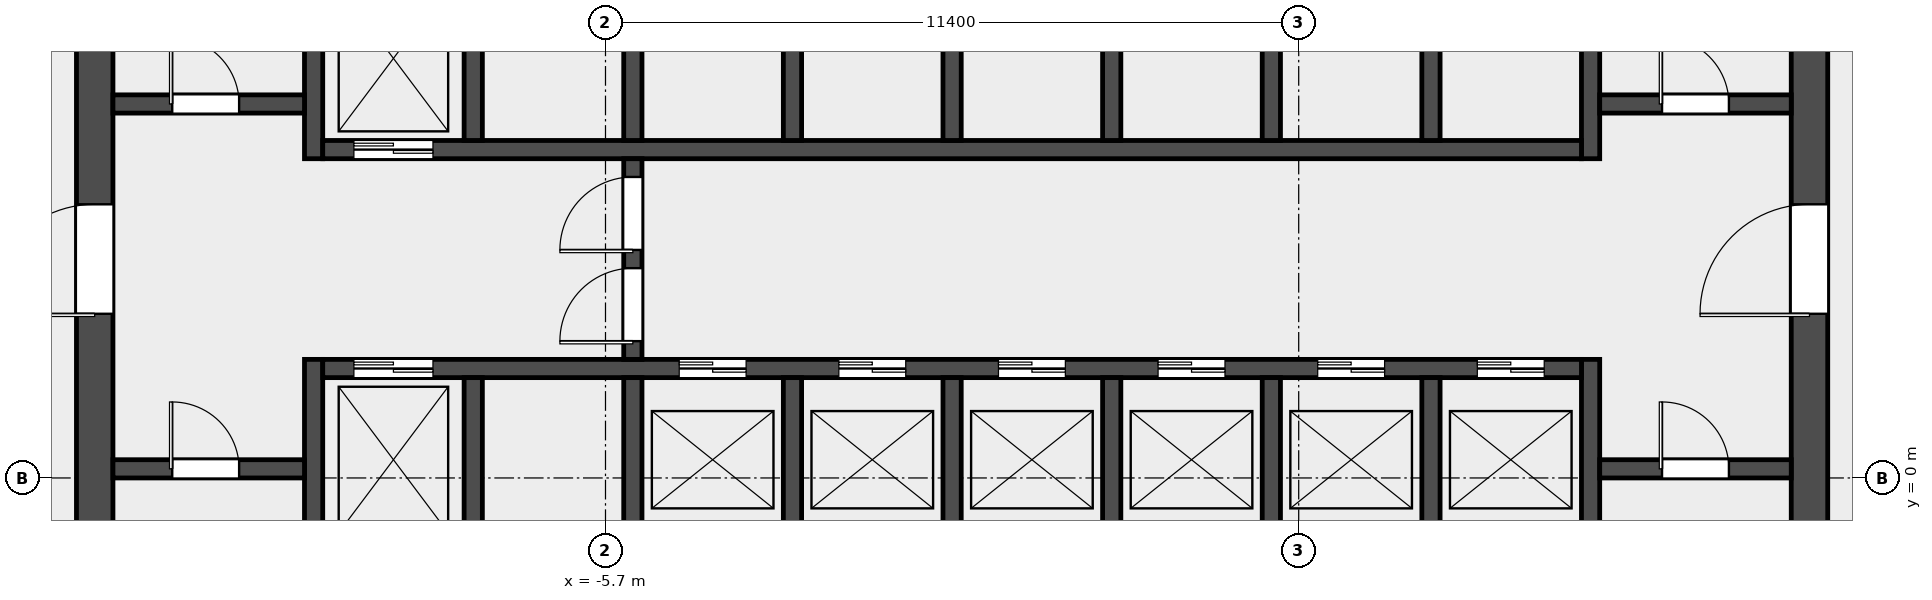
"""IFC4 building model, lengths in metres.
Left out: names, types, materials, properties, quantities, classifications, styles, units other than length and angle.
Written with IfcOpenShell. Run it as: python <this file> out.ifc"""

import sys

from ifc_helpers import new_model, si_unit, direction, frame, frame_2d, origin, place, context, subcontext, project, spatial, rectangle, extrude, element, fill, save


model = new_model("IFC4")
c1 = context("Model", 3, precision=1e-05, world=origin(), true_north=direction((0.0, 1.0)))
c2 = subcontext(c1, "Body", "Model", "MODEL_VIEW")
j1 = project(units=[si_unit("LENGTHUNIT", "METRE"), si_unit("PLANEANGLEUNIT", "RADIAN")], contexts=[c1])
p1 = place(None, origin())
s1 = spatial("IfcSite", under=j1, at=p1, CompositionType="ELEMENT")
p2 = place(p1, origin())
s2 = spatial("IfcBuilding", under=s1, at=p2, CompositionType="ELEMENT")
p3 = place(p2, frame((0.0, 0.0, 83.8)))
s3 = spatial("IfcBuildingStorey", under=s2, at=p3, CompositionType="ELEMENT", Elevation=83.8)
p4 = place(p3, frame((-14.1, -6.6, 0.0), z_axis=(0.0, 0.0, 1.0), x_axis=(0.0, 1.0, 0.0)))
e1 = element("IfcWall", 1, at=p4, inside=s3, PredefinedType="SHEAR", context=c2, shape_type="SweptSolid", body=[
    extrude(rectangle(XDim=19.5, YDim=0.6, at=frame_2d((9.75, 0.0))), origin(), (0.0, 0.0, 1.0), 4.5),
])
p5 = place(p4, frame((9.3, 0.0, 0.0)))
e2 = element("IfcOpeningElement", 2, at=p5, cuts=e1, PredefinedType="OPENING", context=c2, shape_type="SweptSolid", body=[
    extrude(rectangle(XDim=1.8, YDim=2.1, at=frame_2d((0.9, 1.05))), frame((0.0, 0.312, 0.0), z_axis=(0.0, -1.0, 0.0), x_axis=(1.0, 0.0, 0.0)), (0.0, 0.0, 1.0), 0.624),
])
p6 = place(p3, frame((14.1, -6.6, 0.0), z_axis=(0.0, 0.0, 1.0), x_axis=(0.0, 1.0, 0.0)))
e3 = element("IfcWall", 3, at=p6, inside=s3, PredefinedType="SHEAR", context=c2, shape_type="SweptSolid", body=[
    extrude(rectangle(XDim=19.5, YDim=0.6, at=frame_2d((9.75, 0.0))), origin(), (0.0, 0.0, 1.0), 4.5),
])
p7 = place(p6, frame((9.3, 0.0, 0.0)))
e4 = element("IfcOpeningElement", 4, at=p7, cuts=e3, PredefinedType="OPENING", context=c2, shape_type="SweptSolid", body=[
    extrude(rectangle(XDim=1.8, YDim=2.1, at=frame_2d((0.9, 1.05))), frame((0.0, 0.312, 0.0), z_axis=(0.0, -1.0, 0.0), x_axis=(1.0, 0.0, 0.0)), (0.0, 0.0, 1.0), 0.624),
])
p8 = place(p3, frame((-10.5, -6.6, 0.0), z_axis=(0.0, 0.0, 1.0), x_axis=(0.0, 1.0, 0.0)))
e5 = element("IfcWall", 5, at=p8, inside=s3, PredefinedType="SHEAR", context=c2, shape_type="SweptSolid", body=[
    extrude(rectangle(XDim=8.55, YDim=0.3, at=frame_2d((4.275, 0.0))), origin(), (0.0, 0.0, 1.0), 4.5),
])
p9 = place(p3, frame((-10.5, 5.25, 0.0), z_axis=(0.0, 0.0, 1.0), x_axis=(0.0, 1.0, 0.0)))
e6 = element("IfcWall", 6, at=p9, inside=s3, PredefinedType="SHEAR", context=c2, shape_type="SweptSolid", body=[
    extrude(rectangle(XDim=7.65, YDim=0.3, at=frame_2d((3.825, 0.0))), origin(), (0.0, 0.0, 1.0), 4.5),
])
p10 = place(p3, frame((10.5, -6.6, 0.0), z_axis=(0.0, 0.0, 1.0), x_axis=(0.0, 1.0, 0.0)))
e7 = element("IfcWall", 7, at=p10, inside=s3, PredefinedType="SHEAR", context=c2, shape_type="SweptSolid", body=[
    extrude(rectangle(XDim=8.55, YDim=0.3, at=frame_2d((4.275, 0.0))), origin(), (0.0, 0.0, 1.0), 4.5),
])
p11 = place(p3, frame((10.5, 5.25, 0.0), z_axis=(0.0, 0.0, 1.0), x_axis=(0.0, 1.0, 0.0)))
e8 = element("IfcWall", 8, at=p11, inside=s3, PredefinedType="SHEAR", context=c2, shape_type="SweptSolid", body=[
    extrude(rectangle(XDim=7.65, YDim=0.3, at=frame_2d((3.825, 0.0))), origin(), (0.0, 0.0, 1.0), 4.5),
])
p12 = place(p3, frame((-13.8, 0.15, 0.0), z_axis=(0.0, 0.0, 1.0), x_axis=(1.0, 0.0, 0.0)))
e9 = element("IfcWall", 9, at=p12, inside=s3, PredefinedType="SOLIDWALL", context=c2, shape_type="SweptSolid", body=[
    extrude(rectangle(XDim=3.15, YDim=0.3, at=frame_2d((1.575, 0.0))), origin(), (0.0, 0.0, 1.0), 4.5),
])
p13 = place(p12, frame((0.975, 0.0, 0.0)))
e10 = element("IfcOpeningElement", 10, at=p13, cuts=e9, PredefinedType="OPENING", context=c2, shape_type="SweptSolid", body=[
    extrude(rectangle(XDim=1.1, YDim=2.1, at=frame_2d((0.55, 1.05))), frame((0.0, 0.162, 0.0), z_axis=(0.0, -1.0, 0.0), x_axis=(1.0, 0.0, 0.0)), (0.0, 0.0, 1.0), 0.324),
])
p14 = place(p3, frame((-13.8, 6.15, 0.0), z_axis=(0.0, 0.0, 1.0), x_axis=(1.0, 0.0, 0.0)))
e11 = element("IfcWall", 11, at=p14, inside=s3, PredefinedType="SOLIDWALL", context=c2, shape_type="SweptSolid", body=[
    extrude(rectangle(XDim=3.15, YDim=0.3, at=frame_2d((1.575, 0.0))), origin(), (0.0, 0.0, 1.0), 4.5),
])
p15 = place(p14, frame((0.975, 0.0, 0.0)))
e12 = element("IfcOpeningElement", 12, at=p15, cuts=e11, PredefinedType="OPENING", context=c2, shape_type="SweptSolid", body=[
    extrude(rectangle(XDim=1.1, YDim=2.1, at=frame_2d((0.55, 1.05))), frame((0.0, 0.162, 0.0), z_axis=(0.0, -1.0, 0.0), x_axis=(1.0, 0.0, 0.0)), (0.0, 0.0, 1.0), 0.324),
])
p16 = place(p3, frame((10.65, 0.15, 0.0), z_axis=(0.0, 0.0, 1.0), x_axis=(1.0, 0.0, 0.0)))
e13 = element("IfcWall", 13, at=p16, inside=s3, PredefinedType="SOLIDWALL", context=c2, shape_type="SweptSolid", body=[
    extrude(rectangle(XDim=3.15, YDim=0.3, at=frame_2d((1.575, 0.0))), origin(), (0.0, 0.0, 1.0), 4.5),
])
p17 = place(p16, frame((1.025, 0.0, 0.0)))
e14 = element("IfcOpeningElement", 14, at=p17, cuts=e13, PredefinedType="OPENING", context=c2, shape_type="SweptSolid", body=[
    extrude(rectangle(XDim=1.1, YDim=2.1, at=frame_2d((0.55, 1.05))), frame((0.0, 0.162, 0.0), z_axis=(0.0, -1.0, 0.0), x_axis=(1.0, 0.0, 0.0)), (0.0, 0.0, 1.0), 0.324),
])
p18 = place(p3, frame((10.65, 6.15, 0.0), z_axis=(0.0, 0.0, 1.0), x_axis=(1.0, 0.0, 0.0)))
e15 = element("IfcWall", 15, at=p18, inside=s3, PredefinedType="SOLIDWALL", context=c2, shape_type="SweptSolid", body=[
    extrude(rectangle(XDim=3.15, YDim=0.3, at=frame_2d((1.575, 0.0))), origin(), (0.0, 0.0, 1.0), 4.5),
])
p19 = place(p18, frame((1.025, 0.0, 0.0)))
e16 = element("IfcOpeningElement", 16, at=p19, cuts=e15, PredefinedType="OPENING", context=c2, shape_type="SweptSolid", body=[
    extrude(rectangle(XDim=1.1, YDim=2.1, at=frame_2d((0.55, 1.05))), frame((0.0, 0.162, 0.0), z_axis=(0.0, -1.0, 0.0), x_axis=(1.0, 0.0, 0.0)), (0.0, 0.0, 1.0), 0.324),
])
p20 = place(p3, frame((-10.35, 1.8, 0.0), z_axis=(0.0, 0.0, 1.0), x_axis=(1.0, 0.0, 0.0)))
e17 = element("IfcWall", 17, at=p20, inside=s3, PredefinedType="SOLIDWALL", context=c2, shape_type="SweptSolid", body=[
    extrude(rectangle(XDim=20.7, YDim=0.3, at=frame_2d((10.35, 0.0))), origin(), (0.0, 0.0, 1.0), 4.5),
])
p21 = place(p20, frame((0.512, 0.0, 0.0)))
e18 = element("IfcOpeningElement", 18, at=p21, cuts=e17, PredefinedType="OPENING", context=c2, shape_type="SweptSolid", body=[
    extrude(rectangle(XDim=1.3, YDim=2.1, at=frame_2d((0.65, 1.05))), frame((0.0, 0.162, 0.0), z_axis=(0.0, -1.0, 0.0), x_axis=(1.0, 0.0, 0.0)), (0.0, 0.0, 1.0), 0.324),
])
p22 = place(p20, frame((5.863, 0.0, 0.0)))
e19 = element("IfcOpeningElement", 19, at=p22, cuts=e17, PredefinedType="OPENING", context=c2, shape_type="SweptSolid", body=[
    extrude(rectangle(XDim=1.1, YDim=2.1, at=frame_2d((0.55, 1.05))), frame((0.0, 0.162, 0.0), z_axis=(0.0, -1.0, 0.0), x_axis=(1.0, 0.0, 0.0)), (0.0, 0.0, 1.0), 0.324),
])
p23 = place(p20, frame((8.488, 0.0, 0.0)))
e20 = element("IfcOpeningElement", 20, at=p23, cuts=e17, PredefinedType="OPENING", context=c2, shape_type="SweptSolid", body=[
    extrude(rectangle(XDim=1.1, YDim=2.1, at=frame_2d((0.55, 1.05))), frame((0.0, 0.162, 0.0), z_axis=(0.0, -1.0, 0.0), x_axis=(1.0, 0.0, 0.0)), (0.0, 0.0, 1.0), 0.324),
])
p24 = place(p20, frame((11.113, 0.0, 0.0)))
e21 = element("IfcOpeningElement", 21, at=p24, cuts=e17, PredefinedType="OPENING", context=c2, shape_type="SweptSolid", body=[
    extrude(rectangle(XDim=1.1, YDim=2.1, at=frame_2d((0.55, 1.05))), frame((0.0, 0.162, 0.0), z_axis=(0.0, -1.0, 0.0), x_axis=(1.0, 0.0, 0.0)), (0.0, 0.0, 1.0), 0.324),
])
p25 = place(p20, frame((13.738, 0.0, 0.0)))
e22 = element("IfcOpeningElement", 22, at=p25, cuts=e17, PredefinedType="OPENING", context=c2, shape_type="SweptSolid", body=[
    extrude(rectangle(XDim=1.1, YDim=2.1, at=frame_2d((0.55, 1.05))), frame((0.0, 0.162, 0.0), z_axis=(0.0, -1.0, 0.0), x_axis=(1.0, 0.0, 0.0)), (0.0, 0.0, 1.0), 0.324),
])
p26 = place(p20, frame((16.363, 0.0, 0.0)))
e23 = element("IfcOpeningElement", 23, at=p26, cuts=e17, PredefinedType="OPENING", context=c2, shape_type="SweptSolid", body=[
    extrude(rectangle(XDim=1.1, YDim=2.1, at=frame_2d((0.55, 1.05))), frame((0.0, 0.162, 0.0), z_axis=(0.0, -1.0, 0.0), x_axis=(1.0, 0.0, 0.0)), (0.0, 0.0, 1.0), 0.324),
])
p27 = place(p20, frame((18.988, 0.0, 0.0)))
e24 = element("IfcOpeningElement", 24, at=p27, cuts=e17, PredefinedType="OPENING", context=c2, shape_type="SweptSolid", body=[
    extrude(rectangle(XDim=1.1, YDim=2.1, at=frame_2d((0.55, 1.05))), frame((0.0, 0.162, 0.0), z_axis=(0.0, -1.0, 0.0), x_axis=(1.0, 0.0, 0.0)), (0.0, 0.0, 1.0), 0.324),
])
p28 = place(p3, frame((-10.35, 5.4, 0.0), z_axis=(0.0, 0.0, 1.0), x_axis=(1.0, 0.0, 0.0)))
e25 = element("IfcWall", 25, at=p28, inside=s3, PredefinedType="SOLIDWALL", context=c2, shape_type="SweptSolid", body=[
    extrude(rectangle(XDim=20.7, YDim=0.3, at=frame_2d((10.35, 0.0))), origin(), (0.0, 0.0, 1.0), 4.5),
])
p29 = place(p28, frame((0.512, 0.0, 0.0)))
e26 = element("IfcOpeningElement", 26, at=p29, cuts=e25, PredefinedType="OPENING", context=c2, shape_type="SweptSolid", body=[
    extrude(rectangle(XDim=1.3, YDim=2.1, at=frame_2d((0.65, 1.05))), frame((0.0, 0.162, 0.0), z_axis=(0.0, -1.0, 0.0), x_axis=(1.0, 0.0, 0.0)), (0.0, 0.0, 1.0), 0.324),
])
for number, where, z_axis, x_axis in (
    (27, (-7.875, -1.05, 0.0), (0.0, 0.0, 1.0), (0.0, 1.0, 0.0)),
    (28, (-5.25, -1.05, 0.0), (0.0, 0.0, 1.0), (0.0, 1.0, 0.0)),
    (29, (-2.625, -1.05, 0.0), (0.0, 0.0, 1.0), (0.0, 1.0, 0.0)),
    (30, (0.0, -1.05, 0.0), (0.0, 0.0, 1.0), (0.0, 1.0, 0.0)),
    (31, (2.625, -1.05, 0.0), (0.0, 0.0, 1.0), (0.0, 1.0, 0.0)),
    (32, (5.25, -1.05, 0.0), (0.0, 0.0, 1.0), (0.0, 1.0, 0.0)),
    (33, (7.875, -1.05, 0.0), (0.0, 0.0, 1.0), (0.0, 1.0, 0.0)),
    (34, (-7.875, 5.55, 0.0), (0.0, 0.0, 1.0), (0.0, 1.0, 0.0)),
    (35, (-5.25, 5.55, 0.0), (0.0, 0.0, 1.0), (0.0, 1.0, 0.0)),
    (36, (-2.625, 5.55, 0.0), (0.0, 0.0, 1.0), (0.0, 1.0, 0.0)),
    (37, (0.0, 5.55, 0.0), (0.0, 0.0, 1.0), (0.0, 1.0, 0.0)),
    (38, (2.625, 5.55, 0.0), (0.0, 0.0, 1.0), (0.0, 1.0, 0.0)),
    (39, (5.25, 5.55, 0.0), (0.0, 0.0, 1.0), (0.0, 1.0, 0.0)),
    (40, (7.875, 5.55, 0.0), (0.0, 0.0, 1.0), (0.0, 1.0, 0.0)),
):
    element("IfcWall", number, at=place(p3, frame(where, z_axis=z_axis, x_axis=x_axis)), inside=s3, PredefinedType="SOLIDWALL", context=c2, shape_type="SweptSolid", body=[
        extrude(rectangle(XDim=2.7, YDim=0.3, at=frame_2d((1.35, 0.0))), origin(), (0.0, 0.0, 1.0), 4.5),
    ])
p30 = place(p3, frame((-5.25, 1.95, 0.0), z_axis=(0.0, 0.0, 1.0), x_axis=(0.0, 1.0, 0.0)))
e41 = element("IfcWall", 41, at=p30, inside=s3, PredefinedType="SOLIDWALL", context=c2, shape_type="SweptSolid", body=[
    extrude(rectangle(XDim=3.3, YDim=0.3, at=frame_2d((1.65, 0.0))), origin(), (0.0, 0.0, 1.0), 4.5),
])
p31 = place(p30, frame((0.3, 0.0, 0.0)))
e42 = element("IfcOpeningElement", 42, at=p31, cuts=e41, PredefinedType="OPENING", context=c2, shape_type="SweptSolid", body=[
    extrude(rectangle(XDim=1.2, YDim=2.1, at=frame_2d((0.6, 1.05))), frame((0.0, 0.162, 0.0), z_axis=(0.0, -1.0, 0.0), x_axis=(1.0, 0.0, 0.0)), (0.0, 0.0, 1.0), 0.324),
])
p32 = place(p30, frame((1.8, 0.0, 0.0)))
e43 = element("IfcOpeningElement", 43, at=p32, cuts=e41, PredefinedType="OPENING", context=c2, shape_type="SweptSolid", body=[
    extrude(rectangle(XDim=1.2, YDim=2.1, at=frame_2d((0.6, 1.05))), frame((0.0, 0.162, 0.0), z_axis=(0.0, -1.0, 0.0), x_axis=(1.0, 0.0, 0.0)), (0.0, 0.0, 1.0), 0.324),
])
p33 = place(p13, origin())
e44 = element("IfcDoor", 44, at=p33, inside=s3, OperationType="SINGLE_SWING_LEFT", PredefinedType="DOOR", context=c2, shape_type="SweptSolid", body=[
    extrude(rectangle(XDim=1.1, YDim=2.1, at=frame_2d((0.55, 1.05))), frame((0.0, 0.025, 0.0), z_axis=(0.0, -1.0, 0.0), x_axis=(1.0, 0.0, 0.0)), (0.0, 0.0, 1.0), 0.05),
])
fill(e10, e44)
p34 = place(p15, origin())
e45 = element("IfcDoor", 45, at=p34, inside=s3, OperationType="SINGLE_SWING_LEFT", PredefinedType="DOOR", context=c2, shape_type="SweptSolid", body=[
    extrude(rectangle(XDim=1.1, YDim=2.1, at=frame_2d((0.55, 1.05))), frame((0.0, 0.025, 0.0), z_axis=(0.0, -1.0, 0.0), x_axis=(1.0, 0.0, 0.0)), (0.0, 0.0, 1.0), 0.05),
])
fill(e12, e45)
p35 = place(p17, origin())
e46 = element("IfcDoor", 46, at=p35, inside=s3, OperationType="SINGLE_SWING_RIGHT", PredefinedType="DOOR", context=c2, shape_type="SweptSolid", body=[
    extrude(rectangle(XDim=1.1, YDim=2.1, at=frame_2d((0.55, 1.05))), frame((0.0, 0.025, 0.0), z_axis=(0.0, -1.0, 0.0), x_axis=(1.0, 0.0, 0.0)), (0.0, 0.0, 1.0), 0.05),
])
fill(e14, e46)
p36 = place(p19, origin())
e47 = element("IfcDoor", 47, at=p36, inside=s3, OperationType="SINGLE_SWING_RIGHT", PredefinedType="DOOR", context=c2, shape_type="SweptSolid", body=[
    extrude(rectangle(XDim=1.1, YDim=2.1, at=frame_2d((0.55, 1.05))), frame((0.0, 0.025, 0.0), z_axis=(0.0, -1.0, 0.0), x_axis=(1.0, 0.0, 0.0)), (0.0, 0.0, 1.0), 0.05),
])
fill(e16, e47)
p37 = place(p5, origin())
e48 = element("IfcDoor", 48, at=p37, inside=s3, OperationType="DOUBLE_DOOR_SINGLE_SWING", PredefinedType="DOOR", context=c2, shape_type="SweptSolid", body=[
    extrude(rectangle(XDim=1.8, YDim=2.1, at=frame_2d((0.9, 1.05))), frame((0.0, 0.025, 0.0), z_axis=(0.0, -1.0, 0.0), x_axis=(1.0, 0.0, 0.0)), (0.0, 0.0, 1.0), 0.05),
])
fill(e2, e48)
p38 = place(p7, origin())
e49 = element("IfcDoor", 49, at=p38, inside=s3, OperationType="DOUBLE_DOOR_SINGLE_SWING", PredefinedType="DOOR", context=c2, shape_type="SweptSolid", body=[
    extrude(rectangle(XDim=1.8, YDim=2.1, at=frame_2d((0.9, 1.05))), frame((0.0, 0.025, 0.0), z_axis=(0.0, -1.0, 0.0), x_axis=(1.0, 0.0, 0.0)), (0.0, 0.0, 1.0), 0.05),
])
fill(e4, e49)
p39 = place(p31, origin())
e50 = element("IfcDoor", 50, at=p39, inside=s3, OperationType="SINGLE_SWING_LEFT", PredefinedType="DOOR", context=c2, shape_type="SweptSolid", body=[
    extrude(rectangle(XDim=1.2, YDim=2.1, at=frame_2d((0.6, 1.05))), frame((0.0, 0.025, 0.0), z_axis=(0.0, -1.0, 0.0), x_axis=(1.0, 0.0, 0.0)), (0.0, 0.0, 1.0), 0.05),
])
fill(e42, e50)
p40 = place(p32, origin())
e51 = element("IfcDoor", 51, at=p40, inside=s3, OperationType="SINGLE_SWING_RIGHT", PredefinedType="DOOR", context=c2, shape_type="SweptSolid", body=[
    extrude(rectangle(XDim=1.2, YDim=2.1, at=frame_2d((0.6, 1.05))), frame((0.0, 0.025, 0.0), z_axis=(0.0, -1.0, 0.0), x_axis=(1.0, 0.0, 0.0)), (0.0, 0.0, 1.0), 0.05),
])
fill(e43, e51)
p41 = place(p21, origin())
e52 = element("IfcDoor", 52, at=p41, inside=s3, OperationType="DOUBLE_DOOR_SLIDING", PredefinedType="DOOR", context=c2, shape_type="SweptSolid", body=[
    extrude(rectangle(XDim=1.3, YDim=2.1, at=frame_2d((0.65, 1.05))), frame((0.0, 0.025, 0.0), z_axis=(0.0, -1.0, 0.0), x_axis=(1.0, 0.0, 0.0)), (0.0, 0.0, 1.0), 0.05),
])
fill(e18, e52)
p42 = place(p22, origin())
e53 = element("IfcDoor", 53, at=p42, inside=s3, OperationType="DOUBLE_DOOR_SLIDING", PredefinedType="DOOR", context=c2, shape_type="SweptSolid", body=[
    extrude(rectangle(XDim=1.1, YDim=2.1, at=frame_2d((0.55, 1.05))), frame((0.0, 0.025, 0.0), z_axis=(0.0, -1.0, 0.0), x_axis=(1.0, 0.0, 0.0)), (0.0, 0.0, 1.0), 0.05),
])
fill(e19, e53)
p43 = place(p23, origin())
e54 = element("IfcDoor", 54, at=p43, inside=s3, OperationType="DOUBLE_DOOR_SLIDING", PredefinedType="DOOR", context=c2, shape_type="SweptSolid", body=[
    extrude(rectangle(XDim=1.1, YDim=2.1, at=frame_2d((0.55, 1.05))), frame((0.0, 0.025, 0.0), z_axis=(0.0, -1.0, 0.0), x_axis=(1.0, 0.0, 0.0)), (0.0, 0.0, 1.0), 0.05),
])
fill(e20, e54)
p44 = place(p24, origin())
e55 = element("IfcDoor", 55, at=p44, inside=s3, OperationType="DOUBLE_DOOR_SLIDING", PredefinedType="DOOR", context=c2, shape_type="SweptSolid", body=[
    extrude(rectangle(XDim=1.1, YDim=2.1, at=frame_2d((0.55, 1.05))), frame((0.0, 0.025, 0.0), z_axis=(0.0, -1.0, 0.0), x_axis=(1.0, 0.0, 0.0)), (0.0, 0.0, 1.0), 0.05),
])
fill(e21, e55)
p45 = place(p25, origin())
e56 = element("IfcDoor", 56, at=p45, inside=s3, OperationType="DOUBLE_DOOR_SLIDING", PredefinedType="DOOR", context=c2, shape_type="SweptSolid", body=[
    extrude(rectangle(XDim=1.1, YDim=2.1, at=frame_2d((0.55, 1.05))), frame((0.0, 0.025, 0.0), z_axis=(0.0, -1.0, 0.0), x_axis=(1.0, 0.0, 0.0)), (0.0, 0.0, 1.0), 0.05),
])
fill(e22, e56)
p46 = place(p26, origin())
e57 = element("IfcDoor", 57, at=p46, inside=s3, OperationType="DOUBLE_DOOR_SLIDING", PredefinedType="DOOR", context=c2, shape_type="SweptSolid", body=[
    extrude(rectangle(XDim=1.1, YDim=2.1, at=frame_2d((0.55, 1.05))), frame((0.0, 0.025, 0.0), z_axis=(0.0, -1.0, 0.0), x_axis=(1.0, 0.0, 0.0)), (0.0, 0.0, 1.0), 0.05),
])
fill(e23, e57)
p47 = place(p27, origin())
e58 = element("IfcDoor", 58, at=p47, inside=s3, OperationType="DOUBLE_DOOR_SLIDING", PredefinedType="DOOR", context=c2, shape_type="SweptSolid", body=[
    extrude(rectangle(XDim=1.1, YDim=2.1, at=frame_2d((0.55, 1.05))), frame((0.0, 0.025, 0.0), z_axis=(0.0, -1.0, 0.0), x_axis=(1.0, 0.0, 0.0)), (0.0, 0.0, 1.0), 0.05),
])
fill(e24, e58)
p48 = place(p29, origin())
e59 = element("IfcDoor", 59, at=p48, inside=s3, OperationType="DOUBLE_DOOR_SLIDING", PredefinedType="DOOR", context=c2, shape_type="SweptSolid", body=[
    extrude(rectangle(XDim=1.3, YDim=2.1, at=frame_2d((0.65, 1.05))), frame((0.0, 0.025, 0.0), z_axis=(0.0, -1.0, 0.0), x_axis=(1.0, 0.0, 0.0)), (0.0, 0.0, 1.0), 0.05),
])
fill(e26, e59)
save(model, sys.argv[1])
